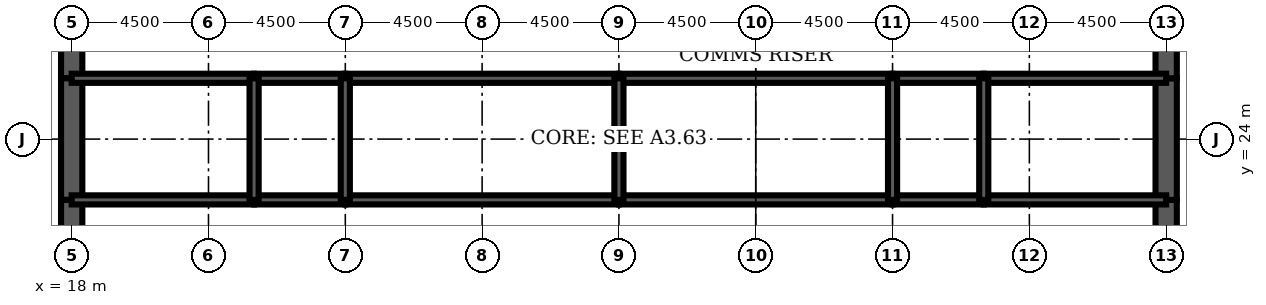
"""IFC4 building model, lengths in metres.
Left out: names, types, materials, properties, quantities, classifications, styles, units other than length and angle.
Written with IfcOpenShell. Run it as: python <this file> out.ifc"""

import sys

from ifc_helpers import new_model, si_unit, direction, frame, frame_2d, origin, place, context, subcontext, project, spatial, rectangle, extrude, element, fill, save


model = new_model("IFC4")
c1 = context("Model", 3, precision=1e-05, world=origin(), true_north=direction((0.0, 1.0)))
c2 = subcontext(c1, "Body", "Model", "MODEL_VIEW")
j1 = project(units=[si_unit("LENGTHUNIT", "METRE"), si_unit("PLANEANGLEUNIT", "RADIAN")], contexts=[c1])
p1 = place(None, origin())
s1 = spatial("IfcSite", under=j1, at=p1, CompositionType="ELEMENT")
p2 = place(p1, origin())
s2 = spatial("IfcBuilding", under=s1, at=p2, CompositionType="ELEMENT")
p3 = place(p2, frame((0.0, 0.0, 271.1)))
s3 = spatial("IfcBuildingStorey", under=s2, at=p3, CompositionType="ELEMENT", Elevation=271.1)
p4 = place(p3, frame((18.0, 28.8, 0.0), z_axis=(0.0, 0.0, 1.0), x_axis=(0.0, -1.0, 0.0)))
e1 = element("IfcWall", 1, at=p4, inside=s3, PredefinedType="SHEAR", context=c2, shape_type="SweptSolid", body=[
    extrude(rectangle(XDim=2.8, YDim=0.7, at=frame_2d((1.4, 0.0))), origin(), (0.0, 0.0, 1.0), 4.2),
])
p5 = place(p4, frame((0.4, 0.0, 0.0)))
e2 = element("IfcOpeningElement", 2, at=p5, cuts=e1, PredefinedType="OPENING", context=c2, shape_type="SweptSolid", body=[
    extrude(rectangle(XDim=1.8, YDim=2.1, at=frame_2d((0.9, 1.05))), frame((0.0, 0.36, 0.0), z_axis=(0.0, -1.0, 0.0), x_axis=(1.0, 0.0, 0.0)), (0.0, 0.0, 1.0), 0.72),
])
p6 = place(p3, frame((18.0, 26.0, 0.0), z_axis=(0.0, 0.0, 1.0), x_axis=(0.0, -1.0, 0.0)))
e3 = element("IfcWall", 3, at=p6, inside=s3, PredefinedType="SHEAR", context=c2, shape_type="SweptSolid", body=[
    extrude(rectangle(XDim=4.0, YDim=0.7, at=frame_2d((2.0, 0.0))), origin(), (0.0, 0.0, 1.0), 4.2),
])
p7 = place(p3, frame((18.0, 22.0, 0.0), z_axis=(0.0, 0.0, 1.0), x_axis=(0.0, -1.0, 0.0)))
e4 = element("IfcWall", 4, at=p7, inside=s3, PredefinedType="SHEAR", context=c2, shape_type="SweptSolid", body=[
    extrude(rectangle(XDim=2.8, YDim=0.7, at=frame_2d((1.4, 0.0))), origin(), (0.0, 0.0, 1.0), 4.2),
])
p8 = place(p7, frame((0.6, 0.0, 0.0)))
e5 = element("IfcOpeningElement", 5, at=p8, cuts=e4, PredefinedType="OPENING", context=c2, shape_type="SweptSolid", body=[
    extrude(rectangle(XDim=1.8, YDim=2.1, at=frame_2d((0.9, 1.05))), frame((0.0, 0.36, 0.0), z_axis=(0.0, -1.0, 0.0), x_axis=(1.0, 0.0, 0.0)), (0.0, 0.0, 1.0), 0.72),
])
p9 = place(p3, frame((54.0, 19.2, 0.0), z_axis=(0.0, 0.0, 1.0), x_axis=(0.0, 1.0, 0.0)))
e6 = element("IfcWall", 6, at=p9, inside=s3, PredefinedType="SHEAR", context=c2, shape_type="SweptSolid", body=[
    extrude(rectangle(XDim=2.8, YDim=0.7, at=frame_2d((1.4, 0.0))), origin(), (0.0, 0.0, 1.0), 4.2),
])
p10 = place(p9, frame((0.4, 0.0, 0.0)))
e7 = element("IfcOpeningElement", 7, at=p10, cuts=e6, PredefinedType="OPENING", context=c2, shape_type="SweptSolid", body=[
    extrude(rectangle(XDim=1.8, YDim=2.1, at=frame_2d((0.9, 1.05))), frame((0.0, 0.36, 0.0), z_axis=(0.0, -1.0, 0.0), x_axis=(1.0, 0.0, 0.0)), (0.0, 0.0, 1.0), 0.72),
])
p11 = place(p3, frame((54.0, 22.0, 0.0), z_axis=(0.0, 0.0, 1.0), x_axis=(0.0, 1.0, 0.0)))
e8 = element("IfcWall", 8, at=p11, inside=s3, PredefinedType="SHEAR", context=c2, shape_type="SweptSolid", body=[
    extrude(rectangle(XDim=4.0, YDim=0.7, at=frame_2d((2.0, 0.0))), origin(), (0.0, 0.0, 1.0), 4.2),
])
p12 = place(p3, frame((54.0, 26.0, 0.0), z_axis=(0.0, 0.0, 1.0), x_axis=(0.0, 1.0, 0.0)))
e9 = element("IfcWall", 9, at=p12, inside=s3, PredefinedType="SHEAR", context=c2, shape_type="SweptSolid", body=[
    extrude(rectangle(XDim=2.8, YDim=0.7, at=frame_2d((1.4, 0.0))), origin(), (0.0, 0.0, 1.0), 4.2),
])
p13 = place(p12, frame((0.6, 0.0, 0.0)))
e10 = element("IfcOpeningElement", 10, at=p13, cuts=e9, PredefinedType="OPENING", context=c2, shape_type="SweptSolid", body=[
    extrude(rectangle(XDim=1.8, YDim=2.1, at=frame_2d((0.9, 1.05))), frame((0.0, 0.36, 0.0), z_axis=(0.0, -1.0, 0.0), x_axis=(1.0, 0.0, 0.0)), (0.0, 0.0, 1.0), 0.72),
])
p14 = place(p3, frame((18.0, 22.0, 0.0), z_axis=(0.0, 0.0, 1.0), x_axis=(1.0, 0.0, 0.0)))
e11 = element("IfcWall", 11, at=p14, inside=s3, PredefinedType="SOLIDWALL", context=c2, shape_type="SweptSolid", body=[
    extrude(rectangle(XDim=6.0, YDim=0.3, at=frame_2d((3.0, 0.0))), origin(), (0.0, 0.0, 1.0), 4.2),
])
p15 = place(p14, frame((2.0, 0.0, 0.0)))
e12 = element("IfcOpeningElement", 12, at=p15, cuts=e11, PredefinedType="OPENING", context=c2, shape_type="SweptSolid", body=[
    extrude(rectangle(XDim=1.0, YDim=2.1, at=frame_2d((0.5, 1.05))), frame((0.0, 0.16, 0.0), z_axis=(0.0, -1.0, 0.0), x_axis=(1.0, 0.0, 0.0)), (0.0, 0.0, 1.0), 0.32),
])
p16 = place(p3, frame((24.0, 22.0, 0.0), z_axis=(0.0, 0.0, 1.0), x_axis=(1.0, 0.0, 0.0)))
e13 = element("IfcWall", 13, at=p16, inside=s3, PredefinedType="SOLIDWALL", context=c2, shape_type="SweptSolid", body=[
    extrude(rectangle(XDim=3.0, YDim=0.3, at=frame_2d((1.5, 0.0))), origin(), (0.0, 0.0, 1.0), 4.2),
])
p17 = place(p16, frame((1.0, 0.0, 0.0)))
e14 = element("IfcOpeningElement", 14, at=p17, cuts=e13, PredefinedType="OPENING", context=c2, shape_type="SweptSolid", body=[
    extrude(rectangle(XDim=1.0, YDim=2.1, at=frame_2d((0.5, 1.05))), frame((0.0, 0.16, 0.0), z_axis=(0.0, -1.0, 0.0), x_axis=(1.0, 0.0, 0.0)), (0.0, 0.0, 1.0), 0.32),
])
p18 = place(p3, frame((27.0, 22.0, 0.0), z_axis=(0.0, 0.0, 1.0), x_axis=(1.0, 0.0, 0.0)))
e15 = element("IfcWall", 15, at=p18, inside=s3, PredefinedType="SOLIDWALL", context=c2, shape_type="SweptSolid", body=[
    extrude(rectangle(XDim=9.0, YDim=0.3, at=frame_2d((4.5, 0.0))), origin(), (0.0, 0.0, 1.0), 4.2),
])
p19 = place(p18, frame((4.0, 0.0, 0.0)))
e16 = element("IfcOpeningElement", 16, at=p19, cuts=e15, PredefinedType="OPENING", context=c2, shape_type="SweptSolid", body=[
    extrude(rectangle(XDim=1.0, YDim=2.1, at=frame_2d((0.5, 1.05))), frame((0.0, 0.16, 0.0), z_axis=(0.0, -1.0, 0.0), x_axis=(1.0, 0.0, 0.0)), (0.0, 0.0, 1.0), 0.32),
])
p20 = place(p3, frame((36.0, 22.0, 0.0), z_axis=(0.0, 0.0, 1.0), x_axis=(1.0, 0.0, 0.0)))
e17 = element("IfcWall", 17, at=p20, inside=s3, PredefinedType="SOLIDWALL", context=c2, shape_type="SweptSolid", body=[
    extrude(rectangle(XDim=9.0, YDim=0.3, at=frame_2d((4.5, 0.0))), origin(), (0.0, 0.0, 1.0), 4.2),
])
p21 = place(p20, frame((4.0, 0.0, 0.0)))
e18 = element("IfcOpeningElement", 18, at=p21, cuts=e17, PredefinedType="OPENING", context=c2, shape_type="SweptSolid", body=[
    extrude(rectangle(XDim=1.0, YDim=2.1, at=frame_2d((0.5, 1.05))), frame((0.0, 0.16, 0.0), z_axis=(0.0, -1.0, 0.0), x_axis=(1.0, 0.0, 0.0)), (0.0, 0.0, 1.0), 0.32),
])
p22 = place(p3, frame((45.0, 22.0, 0.0), z_axis=(0.0, 0.0, 1.0), x_axis=(1.0, 0.0, 0.0)))
e19 = element("IfcWall", 19, at=p22, inside=s3, PredefinedType="SOLIDWALL", context=c2, shape_type="SweptSolid", body=[
    extrude(rectangle(XDim=3.0, YDim=0.3, at=frame_2d((1.5, 0.0))), origin(), (0.0, 0.0, 1.0), 4.2),
])
p23 = place(p22, frame((1.0, 0.0, 0.0)))
e20 = element("IfcOpeningElement", 20, at=p23, cuts=e19, PredefinedType="OPENING", context=c2, shape_type="SweptSolid", body=[
    extrude(rectangle(XDim=1.0, YDim=2.1, at=frame_2d((0.5, 1.05))), frame((0.0, 0.16, 0.0), z_axis=(0.0, -1.0, 0.0), x_axis=(1.0, 0.0, 0.0)), (0.0, 0.0, 1.0), 0.32),
])
p24 = place(p3, frame((48.0, 22.0, 0.0), z_axis=(0.0, 0.0, 1.0), x_axis=(1.0, 0.0, 0.0)))
e21 = element("IfcWall", 21, at=p24, inside=s3, PredefinedType="SOLIDWALL", context=c2, shape_type="SweptSolid", body=[
    extrude(rectangle(XDim=6.0, YDim=0.3, at=frame_2d((3.0, 0.0))), origin(), (0.0, 0.0, 1.0), 4.2),
])
p25 = place(p24, frame((2.0, 0.0, 0.0)))
e22 = element("IfcOpeningElement", 22, at=p25, cuts=e21, PredefinedType="OPENING", context=c2, shape_type="SweptSolid", body=[
    extrude(rectangle(XDim=1.0, YDim=2.1, at=frame_2d((0.5, 1.05))), frame((0.0, 0.16, 0.0), z_axis=(0.0, -1.0, 0.0), x_axis=(1.0, 0.0, 0.0)), (0.0, 0.0, 1.0), 0.32),
])
p26 = place(p24, frame((4.4, 0.0, 0.0)))
e23 = element("IfcOpeningElement", 23, at=p26, cuts=e21, PredefinedType="OPENING", context=c2, shape_type="SweptSolid", body=[
    extrude(rectangle(XDim=1.0, YDim=2.1, at=frame_2d((0.5, 1.05))), frame((0.0, 0.16, 0.0), z_axis=(0.0, -1.0, 0.0), x_axis=(1.0, 0.0, 0.0)), (0.0, 0.0, 1.0), 0.32),
])
p27 = place(p3, frame((18.0, 26.0, 0.0), z_axis=(0.0, 0.0, 1.0), x_axis=(1.0, 0.0, 0.0)))
e24 = element("IfcWall", 24, at=p27, inside=s3, PredefinedType="SOLIDWALL", context=c2, shape_type="SweptSolid", body=[
    extrude(rectangle(XDim=6.0, YDim=0.3, at=frame_2d((3.0, 0.0))), origin(), (0.0, 0.0, 1.0), 4.2),
])
p28 = place(p3, frame((24.0, 26.0, 0.0), z_axis=(0.0, 0.0, 1.0), x_axis=(1.0, 0.0, 0.0)))
e25 = element("IfcWall", 25, at=p28, inside=s3, PredefinedType="SOLIDWALL", context=c2, shape_type="SweptSolid", body=[
    extrude(rectangle(XDim=3.0, YDim=0.3, at=frame_2d((1.5, 0.0))), origin(), (0.0, 0.0, 1.0), 4.2),
])
for number, where, z_axis, x_axis in (
    (26, (27.0, 26.0, 0.0), (0.0, 0.0, 1.0), (1.0, 0.0, 0.0)),
    (27, (36.0, 26.0, 0.0), (0.0, 0.0, 1.0), (1.0, 0.0, 0.0)),
):
    element("IfcWall", number, at=place(p3, frame(where, z_axis=z_axis, x_axis=x_axis)), inside=s3, PredefinedType="SOLIDWALL", context=c2, shape_type="SweptSolid", body=[
        extrude(rectangle(XDim=9.0, YDim=0.3, at=frame_2d((4.5, 0.0))), origin(), (0.0, 0.0, 1.0), 4.2),
    ])
p29 = place(p3, frame((45.0, 26.0, 0.0), z_axis=(0.0, 0.0, 1.0), x_axis=(1.0, 0.0, 0.0)))
e28 = element("IfcWall", 28, at=p29, inside=s3, PredefinedType="SOLIDWALL", context=c2, shape_type="SweptSolid", body=[
    extrude(rectangle(XDim=3.0, YDim=0.3, at=frame_2d((1.5, 0.0))), origin(), (0.0, 0.0, 1.0), 4.2),
])
p30 = place(p3, frame((48.0, 26.0, 0.0), z_axis=(0.0, 0.0, 1.0), x_axis=(1.0, 0.0, 0.0)))
e29 = element("IfcWall", 29, at=p30, inside=s3, PredefinedType="SOLIDWALL", context=c2, shape_type="SweptSolid", body=[
    extrude(rectangle(XDim=6.0, YDim=0.3, at=frame_2d((3.0, 0.0))), origin(), (0.0, 0.0, 1.0), 4.2),
])
for number, where, z_axis, x_axis in (
    (30, (24.0, 22.0, 0.0), (0.0, 0.0, 1.0), (0.0, 1.0, 0.0)),
    (31, (27.0, 22.0, 0.0), (0.0, 0.0, 1.0), (0.0, 1.0, 0.0)),
    (32, (36.0, 22.0, 0.0), (0.0, 0.0, 1.0), (0.0, 1.0, 0.0)),
    (33, (45.0, 22.0, 0.0), (0.0, 0.0, 1.0), (0.0, 1.0, 0.0)),
    (34, (48.0, 22.0, 0.0), (0.0, 0.0, 1.0), (0.0, 1.0, 0.0)),
):
    element("IfcWall", number, at=place(p3, frame(where, z_axis=z_axis, x_axis=x_axis)), inside=s3, PredefinedType="SOLIDWALL", context=c2, shape_type="SweptSolid", body=[
        extrude(rectangle(XDim=4.0, YDim=0.3, at=frame_2d((2.0, 0.0))), origin(), (0.0, 0.0, 1.0), 4.2),
    ])
p31 = place(p3, frame((38.5, 22.15, 0.0), z_axis=(0.0, 0.0, 1.0), x_axis=(0.0, 1.0, 0.0)))
e35 = element("IfcWall", 35, at=p31, inside=s3, PredefinedType="PARTITIONING", context=c2, shape_type="SweptSolid", body=[
    extrude(rectangle(XDim=3.7, YDim=0.15, at=frame_2d((1.85, 0.0))), origin(), (0.0, 0.0, 1.0), 3.0),
])
p32 = place(p31, frame((2.2, 0.0, 0.0)))
e36 = element("IfcOpeningElement", 36, at=p32, cuts=e35, PredefinedType="OPENING", context=c2, shape_type="SweptSolid", body=[
    extrude(rectangle(XDim=1.0, YDim=2.1, at=frame_2d((0.5, 1.05))), frame((0.0, 0.085, 0.0), z_axis=(0.0, -1.0, 0.0), x_axis=(1.0, 0.0, 0.0)), (0.0, 0.0, 1.0), 0.17),
])
p33 = place(p3, frame((52.075, 22.15, 0.0), z_axis=(0.0, 0.0, 1.0), x_axis=(0.0, 1.0, 0.0)))
e37 = element("IfcWall", 37, at=p33, inside=s3, PredefinedType="PARTITIONING", context=c2, shape_type="SweptSolid", body=[
    extrude(rectangle(XDim=3.7, YDim=0.15, at=frame_2d((1.85, 0.0))), origin(), (0.0, 0.0, 1.0), 3.0),
])
p34 = place(p32, origin())
e38 = element("IfcDoor", 38, at=p34, inside=s3, OperationType="SINGLE_SWING_RIGHT", PredefinedType="DOOR", context=c2, shape_type="SweptSolid", body=[
    extrude(rectangle(XDim=1.0, YDim=2.1, at=frame_2d((0.5, 1.05))), frame((0.0, 0.025, 0.0), z_axis=(0.0, -1.0, 0.0), x_axis=(1.0, 0.0, 0.0)), (0.0, 0.0, 1.0), 0.05),
])
fill(e36, e38)
p35 = place(p8, origin())
e39 = element("IfcDoor", 39, at=p35, inside=s3, OperationType="SINGLE_SWING_LEFT", PredefinedType="DOOR", context=c2, shape_type="SweptSolid", body=[
    extrude(rectangle(XDim=1.8, YDim=2.1, at=frame_2d((0.9, 1.05))), frame((0.0, 0.35, 0.0), z_axis=(0.0, -1.0, 0.0), x_axis=(1.0, 0.0, 0.0)), (0.0, 0.0, 1.0), 0.699),
])
fill(e5, e39)
p36 = place(p5, origin())
e40 = element("IfcDoor", 40, at=p36, inside=s3, OperationType="SINGLE_SWING_LEFT", PredefinedType="DOOR", context=c2, shape_type="SweptSolid", body=[
    extrude(rectangle(XDim=1.8, YDim=2.1, at=frame_2d((0.9, 1.05))), frame((0.0, 0.35, 0.0), z_axis=(0.0, -1.0, 0.0), x_axis=(1.0, 0.0, 0.0)), (0.0, 0.0, 1.0), 0.699),
])
fill(e2, e40)
p37 = place(p10, origin())
e41 = element("IfcDoor", 41, at=p37, inside=s3, OperationType="SINGLE_SWING_LEFT", PredefinedType="DOOR", context=c2, shape_type="SweptSolid", body=[
    extrude(rectangle(XDim=1.8, YDim=2.1, at=frame_2d((0.9, 1.05))), frame((0.0, 0.35, 0.0), z_axis=(0.0, -1.0, 0.0), x_axis=(1.0, 0.0, 0.0)), (0.0, 0.0, 1.0), 0.699),
])
fill(e7, e41)
p38 = place(p13, origin())
e42 = element("IfcDoor", 42, at=p38, inside=s3, OperationType="SINGLE_SWING_LEFT", PredefinedType="DOOR", context=c2, shape_type="SweptSolid", body=[
    extrude(rectangle(XDim=1.8, YDim=2.1, at=frame_2d((0.9, 1.05))), frame((0.0, 0.35, 0.0), z_axis=(0.0, -1.0, 0.0), x_axis=(1.0, 0.0, 0.0)), (0.0, 0.0, 1.0), 0.699),
])
fill(e10, e42)
p39 = place(p15, origin())
e43 = element("IfcDoor", 43, at=p39, inside=s3, OperationType="SINGLE_SWING_LEFT", PredefinedType="DOOR", context=c2, shape_type="SweptSolid", body=[
    extrude(rectangle(XDim=1.0, YDim=2.1, at=frame_2d((0.5, 1.05))), frame((0.0, 0.025, 0.0), z_axis=(0.0, -1.0, 0.0), x_axis=(1.0, 0.0, 0.0)), (0.0, 0.0, 1.0), 0.05),
])
fill(e12, e43)
p40 = place(p17, origin())
e44 = element("IfcDoor", 44, at=p40, inside=s3, OperationType="SINGLE_SWING_LEFT", PredefinedType="DOOR", context=c2, shape_type="SweptSolid", body=[
    extrude(rectangle(XDim=1.0, YDim=2.1, at=frame_2d((0.5, 1.05))), frame((0.0, 0.025, 0.0), z_axis=(0.0, -1.0, 0.0), x_axis=(1.0, 0.0, 0.0)), (0.0, 0.0, 1.0), 0.05),
])
fill(e14, e44)
p41 = place(p19, origin())
e45 = element("IfcDoor", 45, at=p41, inside=s3, OperationType="SINGLE_SWING_LEFT", PredefinedType="DOOR", context=c2, shape_type="SweptSolid", body=[
    extrude(rectangle(XDim=1.0, YDim=2.1, at=frame_2d((0.5, 1.05))), frame((0.0, 0.025, 0.0), z_axis=(0.0, -1.0, 0.0), x_axis=(1.0, 0.0, 0.0)), (0.0, 0.0, 1.0), 0.05),
])
fill(e16, e45)
p42 = place(p21, origin())
e46 = element("IfcDoor", 46, at=p42, inside=s3, OperationType="SINGLE_SWING_LEFT", PredefinedType="DOOR", context=c2, shape_type="SweptSolid", body=[
    extrude(rectangle(XDim=1.0, YDim=2.1, at=frame_2d((0.5, 1.05))), frame((0.0, 0.025, 0.0), z_axis=(0.0, -1.0, 0.0), x_axis=(1.0, 0.0, 0.0)), (0.0, 0.0, 1.0), 0.05),
])
fill(e18, e46)
p43 = place(p23, origin())
e47 = element("IfcDoor", 47, at=p43, inside=s3, OperationType="SINGLE_SWING_LEFT", PredefinedType="DOOR", context=c2, shape_type="SweptSolid", body=[
    extrude(rectangle(XDim=1.0, YDim=2.1, at=frame_2d((0.5, 1.05))), frame((0.0, 0.025, 0.0), z_axis=(0.0, -1.0, 0.0), x_axis=(1.0, 0.0, 0.0)), (0.0, 0.0, 1.0), 0.05),
])
fill(e20, e47)
p44 = place(p25, origin())
e48 = element("IfcDoor", 48, at=p44, inside=s3, OperationType="SINGLE_SWING_LEFT", PredefinedType="DOOR", context=c2, shape_type="SweptSolid", body=[
    extrude(rectangle(XDim=1.0, YDim=2.1, at=frame_2d((0.5, 1.05))), frame((0.0, 0.025, 0.0), z_axis=(0.0, -1.0, 0.0), x_axis=(1.0, 0.0, 0.0)), (0.0, 0.0, 1.0), 0.05),
])
fill(e22, e48)
p45 = place(p26, origin())
e49 = element("IfcDoor", 49, at=p45, inside=s3, OperationType="SINGLE_SWING_RIGHT", PredefinedType="DOOR", context=c2, shape_type="SweptSolid", body=[
    extrude(rectangle(XDim=1.0, YDim=2.1, at=frame_2d((0.5, 1.05))), frame((0.0, 0.025, 0.0), z_axis=(0.0, -1.0, 0.0), x_axis=(1.0, 0.0, 0.0)), (0.0, 0.0, 1.0), 0.05),
])
fill(e23, e49)
save(model, sys.argv[1])
